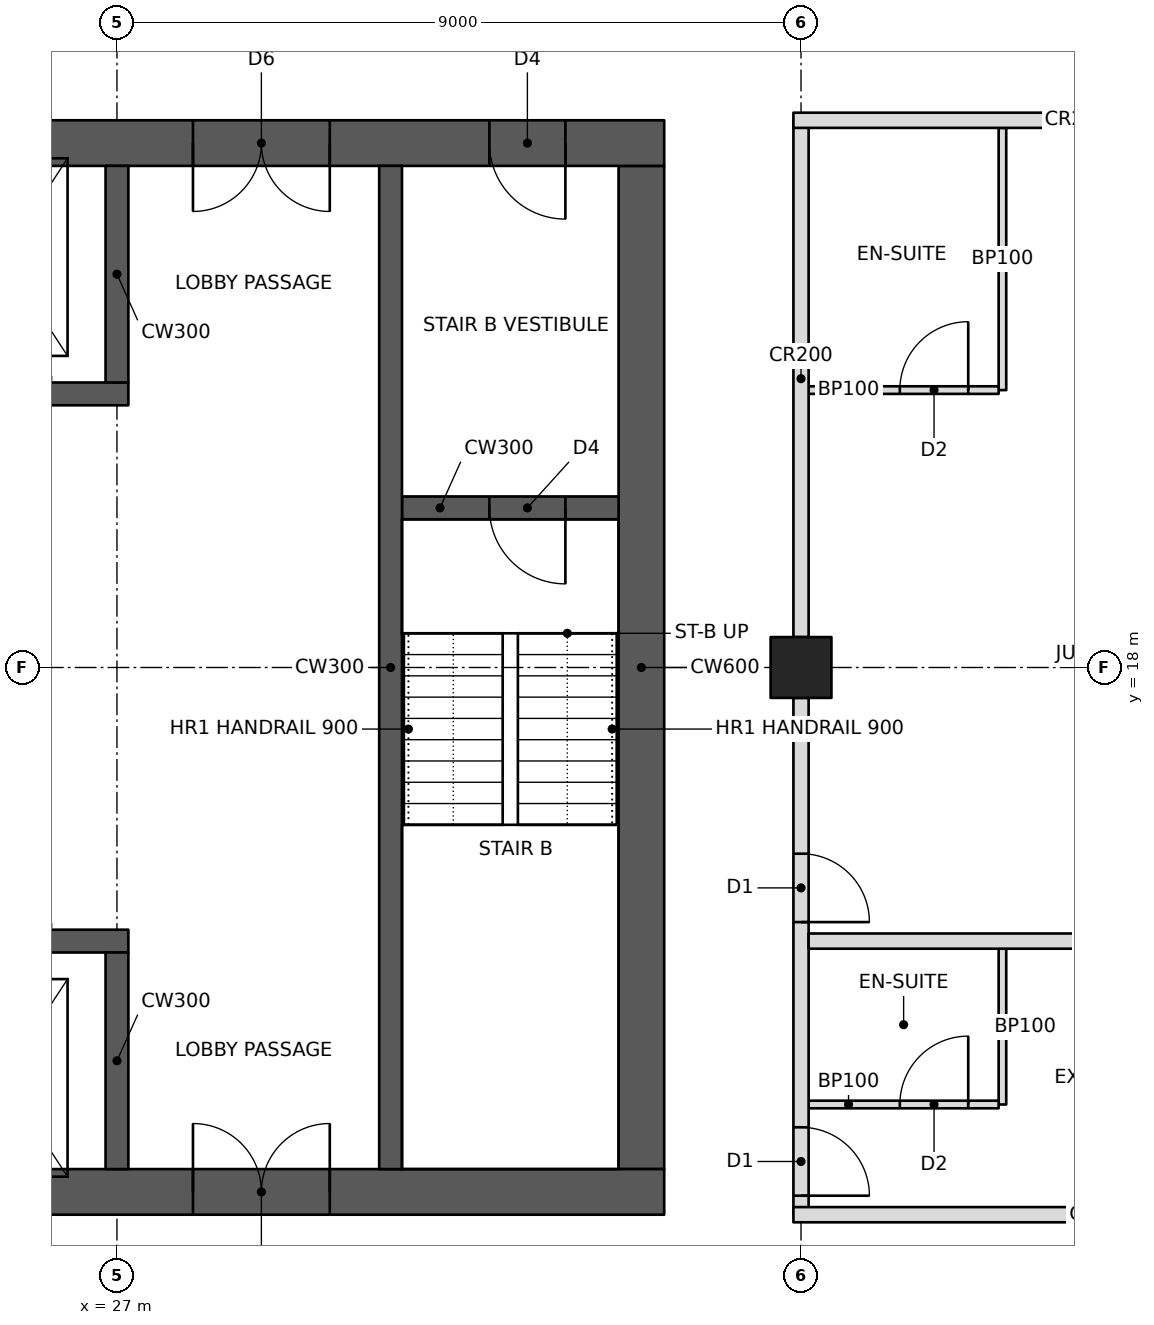
"""IFC4 building model, lengths in metres.
Left out: names, types, materials, properties, quantities, classifications, styles, units other than length and angle.
Written with IfcOpenShell. Run it as: python <this file> out.ifc"""

import sys

from ifc_helpers import new_model, si_unit, direction, frame, frame_2d, origin, origin_2d, place, context, subcontext, project, spatial, rectangle, hollow_rectangle, extrude, element, fill, save


model = new_model("IFC4")
c1 = context("Model", 3, precision=1e-05, world=origin(), true_north=direction((0.0, 1.0)))
c2 = subcontext(c1, "Body", "Model", "MODEL_VIEW")
j1 = project(units=[si_unit("LENGTHUNIT", "METRE"), si_unit("PLANEANGLEUNIT", "RADIAN")], contexts=[c1])
p1 = place(None, origin())
s1 = spatial("IfcSite", under=j1, at=p1, CompositionType="ELEMENT")
p2 = place(p1, origin())
s2 = spatial("IfcBuilding", under=s1, at=p2, CompositionType="ELEMENT")
p3 = place(p2, frame((0.0, 0.0, 177.4)))
s3 = spatial("IfcBuildingStorey", under=s2, at=p3, CompositionType="ELEMENT", Elevation=177.4)
p4 = place(p3, frame((36.0, 18.0, 0.0), z_axis=(0.0, 0.0, 1.0), x_axis=(0.0, 1.0, 0.0)))
e1 = element("IfcColumn", 1, at=p4, inside=s3, PredefinedType="COLUMN", context=c2, shape_type="SweptSolid", body=[
    extrude(hollow_rectangle(XDim=0.8, YDim=0.8, WallThickness=0.06, at=origin_2d()), origin(), (0.0, 0.0, 1.0), 3.4),
])
p5 = place(p3, frame((10.8, 11.1, 0.0), z_axis=(0.0, 0.0, 1.0), x_axis=(1.0, 0.0, 0.0)))
e2 = element("IfcWall", 2, at=p5, inside=s3, PredefinedType="SHEAR", context=c2, shape_type="SweptSolid", body=[
    extrude(rectangle(XDim=23.4, YDim=0.6, at=frame_2d((11.7, 0.0))), origin(), (0.0, 0.0, 1.0), 3.4),
])
p6 = place(p5, frame((1.0, 0.0, 0.0)))
e3 = element("IfcOpeningElement", 3, at=p6, cuts=e2, PredefinedType="OPENING", context=c2, shape_type="SweptSolid", body=[
    extrude(rectangle(XDim=1.0, YDim=2.1, at=frame_2d((0.5, 1.05))), frame((0.0, 0.31, 0.0), z_axis=(0.0, -1.0, 0.0), x_axis=(1.0, 0.0, 0.0)), (0.0, 0.0, 1.0), 0.62),
])
p7 = place(p5, frame((17.2, 0.0, 0.0)))
e4 = element("IfcOpeningElement", 4, at=p7, cuts=e2, PredefinedType="OPENING", context=c2, shape_type="SweptSolid", body=[
    extrude(rectangle(XDim=1.8, YDim=2.1, at=frame_2d((0.9, 1.05))), frame((0.0, 0.31, 0.0), z_axis=(0.0, -1.0, 0.0), x_axis=(1.0, 0.0, 0.0)), (0.0, 0.0, 1.0), 0.62),
])
p8 = place(p3, frame((10.8, 24.9, 0.0), z_axis=(0.0, 0.0, 1.0), x_axis=(1.0, 0.0, 0.0)))
e5 = element("IfcWall", 5, at=p8, inside=s3, PredefinedType="SHEAR", context=c2, shape_type="SweptSolid", body=[
    extrude(rectangle(XDim=23.4, YDim=0.6, at=frame_2d((11.7, 0.0))), origin(), (0.0, 0.0, 1.0), 3.4),
])
p9 = place(p8, frame((17.2, 0.0, 0.0)))
e6 = element("IfcOpeningElement", 6, at=p9, cuts=e5, PredefinedType="OPENING", context=c2, shape_type="SweptSolid", body=[
    extrude(rectangle(XDim=1.8, YDim=2.1, at=frame_2d((0.9, 1.05))), frame((0.0, 0.31, 0.0), z_axis=(0.0, -1.0, 0.0), x_axis=(1.0, 0.0, 0.0)), (0.0, 0.0, 1.0), 0.62),
])
p10 = place(p8, frame((21.1, 0.0, 0.0)))
e7 = element("IfcOpeningElement", 7, at=p10, cuts=e5, PredefinedType="OPENING", context=c2, shape_type="SweptSolid", body=[
    extrude(rectangle(XDim=1.0, YDim=2.1, at=frame_2d((0.5, 1.05))), frame((0.0, 0.31, 0.0), z_axis=(0.0, -1.0, 0.0), x_axis=(1.0, 0.0, 0.0)), (0.0, 0.0, 1.0), 0.62),
])
p11 = place(p8, frame((4.9, 0.0, 0.0)))
e8 = element("IfcOpeningElement", 8, at=p11, cuts=e5, PredefinedType="OPENING", context=c2, shape_type="SweptSolid", body=[
    extrude(rectangle(XDim=1.0, YDim=2.1, at=frame_2d((0.5, 1.05))), frame((0.0, 0.31, 0.0), z_axis=(0.0, -1.0, 0.0), x_axis=(1.0, 0.0, 0.0)), (0.0, 0.0, 1.0), 0.62),
])
p12 = place(p3, frame((33.9, 11.4, 0.0), z_axis=(0.0, 0.0, 1.0), x_axis=(0.0, 1.0, 0.0)))
e9 = element("IfcWall", 9, at=p12, inside=s3, PredefinedType="SHEAR", context=c2, shape_type="SweptSolid", body=[
    extrude(rectangle(XDim=13.2, YDim=0.6, at=frame_2d((6.6, 0.0))), origin(), (0.0, 0.0, 1.0), 3.4),
])
p13 = place(p3, frame((18.15, 14.4, 0.0), z_axis=(0.0, 0.0, 1.0), x_axis=(1.0, 0.0, 0.0)))
e10 = element("IfcWall", 10, at=p13, inside=s3, PredefinedType="SHEAR", context=c2, shape_type="SweptSolid", body=[
    extrude(rectangle(XDim=9.0, YDim=0.3, at=frame_2d((4.5, 0.0))), origin(), (0.0, 0.0, 1.0), 3.4),
])
p14 = place(p13, frame((0.8, 0.0, 0.0)))
e11 = element("IfcOpeningElement", 11, at=p14, cuts=e10, PredefinedType="OPENING", context=c2, shape_type="SweptSolid", body=[
    extrude(rectangle(XDim=1.1, YDim=2.1, at=frame_2d((0.55, 1.05))), frame((0.0, 0.16, 0.0), z_axis=(0.0, -1.0, 0.0), x_axis=(1.0, 0.0, 0.0)), (0.0, 0.0, 1.0), 0.32),
])
p15 = place(p13, frame((6.75, 0.0, 0.0)))
e12 = element("IfcOpeningElement", 12, at=p15, cuts=e10, PredefinedType="OPENING", context=c2, shape_type="SweptSolid", body=[
    extrude(rectangle(XDim=1.2, YDim=2.1, at=frame_2d((0.6, 1.05))), frame((0.0, 0.16, 0.0), z_axis=(0.0, -1.0, 0.0), x_axis=(1.0, 0.0, 0.0)), (0.0, 0.0, 1.0), 0.32),
])
p16 = place(p13, frame((3.8, 0.0, 0.0)))
e13 = element("IfcOpeningElement", 13, at=p16, cuts=e10, PredefinedType="OPENING", context=c2, shape_type="SweptSolid", body=[
    extrude(rectangle(XDim=1.1, YDim=2.1, at=frame_2d((0.55, 1.05))), frame((0.0, 0.16, 0.0), z_axis=(0.0, -1.0, 0.0), x_axis=(1.0, 0.0, 0.0)), (0.0, 0.0, 1.0), 0.32),
])
p17 = place(p3, frame((27.0, 11.4, 0.0), z_axis=(0.0, 0.0, 1.0), x_axis=(0.0, 1.0, 0.0)))
e14 = element("IfcWall", 14, at=p17, inside=s3, PredefinedType="SHEAR", context=c2, shape_type="SweptSolid", body=[
    extrude(rectangle(XDim=2.85, YDim=0.3, at=frame_2d((1.425, 0.0))), origin(), (0.0, 0.0, 1.0), 3.4),
])
p18 = place(p3, frame((18.15, 21.6, 0.0), z_axis=(0.0, 0.0, 1.0), x_axis=(1.0, 0.0, 0.0)))
e15 = element("IfcWall", 15, at=p18, inside=s3, PredefinedType="SHEAR", context=c2, shape_type="SweptSolid", body=[
    extrude(rectangle(XDim=9.0, YDim=0.3, at=frame_2d((4.5, 0.0))), origin(), (0.0, 0.0, 1.0), 3.4),
])
p19 = place(p18, frame((6.75, 0.0, 0.0)))
e16 = element("IfcOpeningElement", 16, at=p19, cuts=e15, PredefinedType="OPENING", context=c2, shape_type="SweptSolid", body=[
    extrude(rectangle(XDim=1.2, YDim=2.1, at=frame_2d((0.6, 1.05))), frame((0.0, 0.16, 0.0), z_axis=(0.0, -1.0, 0.0), x_axis=(1.0, 0.0, 0.0)), (0.0, 0.0, 1.0), 0.32),
])
p20 = place(p18, frame((0.8, 0.0, 0.0)))
e17 = element("IfcOpeningElement", 17, at=p20, cuts=e15, PredefinedType="OPENING", context=c2, shape_type="SweptSolid", body=[
    extrude(rectangle(XDim=1.1, YDim=2.1, at=frame_2d((0.55, 1.05))), frame((0.0, 0.16, 0.0), z_axis=(0.0, -1.0, 0.0), x_axis=(1.0, 0.0, 0.0)), (0.0, 0.0, 1.0), 0.32),
])
p21 = place(p18, frame((3.8, 0.0, 0.0)))
e18 = element("IfcOpeningElement", 18, at=p21, cuts=e15, PredefinedType="OPENING", context=c2, shape_type="SweptSolid", body=[
    extrude(rectangle(XDim=1.1, YDim=2.1, at=frame_2d((0.55, 1.05))), frame((0.0, 0.16, 0.0), z_axis=(0.0, -1.0, 0.0), x_axis=(1.0, 0.0, 0.0)), (0.0, 0.0, 1.0), 0.32),
])
p22 = place(p3, frame((27.0, 21.75, 0.0), z_axis=(0.0, 0.0, 1.0), x_axis=(0.0, 1.0, 0.0)))
e19 = element("IfcWall", 19, at=p22, inside=s3, PredefinedType="SHEAR", context=c2, shape_type="SweptSolid", body=[
    extrude(rectangle(XDim=2.85, YDim=0.3, at=frame_2d((1.425, 0.0))), origin(), (0.0, 0.0, 1.0), 3.4),
])
p23 = place(p3, frame((30.6, 11.4, 0.0), z_axis=(0.0, 0.0, 1.0), x_axis=(0.0, 1.0, 0.0)))
e20 = element("IfcWall", 20, at=p23, inside=s3, PredefinedType="SHEAR", context=c2, shape_type="SweptSolid", body=[
    extrude(rectangle(XDim=13.2, YDim=0.3, at=frame_2d((6.6, 0.0))), origin(), (0.0, 0.0, 1.0), 3.4),
])
p24 = place(p3, frame((30.75, 20.1, 0.0), z_axis=(0.0, 0.0, 1.0), x_axis=(1.0, 0.0, 0.0)))
e21 = element("IfcWall", 21, at=p24, inside=s3, PredefinedType="SHEAR", context=c2, shape_type="SweptSolid", body=[
    extrude(rectangle(XDim=2.85, YDim=0.3, at=frame_2d((1.425, 0.0))), origin(), (0.0, 0.0, 1.0), 3.4),
])
p25 = place(p24, frame((1.15, 0.0, 0.0)))
e22 = element("IfcOpeningElement", 22, at=p25, cuts=e21, PredefinedType="OPENING", context=c2, shape_type="SweptSolid", body=[
    extrude(rectangle(XDim=1.0, YDim=2.1, at=frame_2d((0.5, 1.05))), frame((0.0, 0.16, 0.0), z_axis=(0.0, -1.0, 0.0), x_axis=(1.0, 0.0, 0.0)), (0.0, 0.0, 1.0), 0.32),
])
p26 = place(p3, frame((36.0, 10.8, 0.0), z_axis=(0.0, 0.0, 1.0), x_axis=(0.0, 1.0, 0.0)))
e23 = element("IfcWall", 23, at=p26, inside=s3, PredefinedType="PARTITIONING", context=c2, shape_type="SweptSolid", body=[
    extrude(rectangle(XDim=6.8, YDim=0.2, at=frame_2d((3.4, 0.0))), origin(), (0.0, 0.0, 1.0), 2.405),
])
p27 = place(p26, frame((0.25, 0.0, 0.0)))
e24 = element("IfcOpeningElement", 24, at=p27, cuts=e23, PredefinedType="OPENING", context=c2, shape_type="SweptSolid", body=[
    extrude(rectangle(XDim=0.9, YDim=2.1, at=frame_2d((0.45, 1.05))), frame((0.0, 0.11, 0.0), z_axis=(0.0, -1.0, 0.0), x_axis=(1.0, 0.0, 0.0)), (0.0, 0.0, 1.0), 0.22),
])
p28 = place(p26, frame((3.85, 0.0, 0.0)))
e25 = element("IfcOpeningElement", 25, at=p28, cuts=e23, PredefinedType="OPENING", context=c2, shape_type="SweptSolid", body=[
    extrude(rectangle(XDim=0.9, YDim=2.1, at=frame_2d((0.45, 1.05))), frame((0.0, 0.11, 0.0), z_axis=(0.0, -1.0, 0.0), x_axis=(1.0, 0.0, 0.0)), (0.0, 0.0, 1.0), 0.22),
])
p29 = place(p3, frame((36.0, 18.4, 0.0), z_axis=(0.0, 0.0, 1.0), x_axis=(0.0, 1.0, 0.0)))
e26 = element("IfcWall", 26, at=p29, inside=s3, PredefinedType="PARTITIONING", context=c2, shape_type="SweptSolid", body=[
    extrude(rectangle(XDim=6.8, YDim=0.2, at=frame_2d((3.4, 0.0))), origin(), (0.0, 0.0, 1.0), 2.405),
])
p30 = place(p3, frame((35.9, 10.8, 0.0), z_axis=(0.0, 0.0, 1.0), x_axis=(1.0, 0.0, 0.0)))
e27 = element("IfcWall", 27, at=p30, inside=s3, PredefinedType="PARTITIONING", context=c2, shape_type="SweptSolid", body=[
    extrude(rectangle(XDim=8.1, YDim=0.2, at=frame_2d((4.05, 0.0))), origin(), (0.0, 0.0, 1.0), 2.404),
])
p31 = place(p3, frame((35.9, 25.2, 0.0), z_axis=(0.0, 0.0, 1.0), x_axis=(1.0, 0.0, 0.0)))
e28 = element("IfcWall", 28, at=p31, inside=s3, PredefinedType="PARTITIONING", context=c2, shape_type="SweptSolid", body=[
    extrude(rectangle(XDim=7.45, YDim=0.2, at=frame_2d((3.725, 0.0))), origin(), (0.0, 0.0, 1.0), 2.404),
])
p32 = place(p3, frame((36.1, 14.4, 0.0), z_axis=(0.0, 0.0, 1.0), x_axis=(1.0, 0.0, 0.0)))
e29 = element("IfcWall", 29, at=p32, inside=s3, PredefinedType="PARTITIONING", context=c2, shape_type="SweptSolid", body=[
    extrude(rectangle(XDim=7.9, YDim=0.2, at=frame_2d((3.95, 0.0))), origin(), (0.0, 0.0, 1.0), 2.404),
])
p33 = place(p3, frame((38.65, 12.25, 0.0), z_axis=(0.0, 0.0, 1.0), x_axis=(0.0, 1.0, 0.0)))
e30 = element("IfcWall", 30, at=p33, inside=s3, PredefinedType="PARTITIONING", context=c2, shape_type="SweptSolid", body=[
    extrude(rectangle(XDim=2.05, YDim=0.1, at=frame_2d((1.025, 0.0))), origin(), (0.0, 0.0, 1.0), 3.2),
])
p34 = place(p3, frame((36.1, 12.25, 0.0), z_axis=(0.0, 0.0, 1.0), x_axis=(1.0, 0.0, 0.0)))
e31 = element("IfcWall", 31, at=p34, inside=s3, PredefinedType="PARTITIONING", context=c2, shape_type="SweptSolid", body=[
    extrude(rectangle(XDim=2.5, YDim=0.1, at=frame_2d((1.25, 0.0))), origin(), (0.0, 0.0, 1.0), 2.404),
])
p35 = place(p34, frame((1.2, 0.0, 0.0)))
e32 = element("IfcOpeningElement", 32, at=p35, cuts=e31, PredefinedType="OPENING", context=c2, shape_type="SweptSolid", body=[
    extrude(rectangle(XDim=0.9, YDim=2.1, at=frame_2d((0.45, 1.05))), frame((0.0, 0.06, 0.0), z_axis=(0.0, -1.0, 0.0), x_axis=(1.0, 0.0, 0.0)), (0.0, 0.0, 1.0), 0.12),
])
p36 = place(p3, frame((38.65, 21.65, 0.0), z_axis=(0.0, 0.0, 1.0), x_axis=(0.0, 1.0, 0.0)))
e33 = element("IfcWall", 33, at=p36, inside=s3, PredefinedType="PARTITIONING", context=c2, shape_type="SweptSolid", body=[
    extrude(rectangle(XDim=3.45, YDim=0.1, at=frame_2d((1.725, 0.0))), origin(), (0.0, 0.0, 1.0), 3.2),
])
p37 = place(p3, frame((36.1, 21.65, 0.0), z_axis=(0.0, 0.0, 1.0), x_axis=(1.0, 0.0, 0.0)))
e34 = element("IfcWall", 34, at=p37, inside=s3, PredefinedType="PARTITIONING", context=c2, shape_type="SweptSolid", body=[
    extrude(rectangle(XDim=2.5, YDim=0.1, at=frame_2d((1.25, 0.0))), origin(), (0.0, 0.0, 1.0), 2.404),
])
p38 = place(p37, frame((1.2, 0.0, 0.0)))
e35 = element("IfcOpeningElement", 35, at=p38, cuts=e34, PredefinedType="OPENING", context=c2, shape_type="SweptSolid", body=[
    extrude(rectangle(XDim=0.9, YDim=2.1, at=frame_2d((0.45, 1.05))), frame((0.0, 0.06, 0.0), z_axis=(0.0, -1.0, 0.0), x_axis=(1.0, 0.0, 0.0)), (0.0, 0.0, 1.0), 0.12),
])
p39 = place(p35, origin())
e36 = element("IfcDoor", 36, at=p39, inside=s3, OperationType="SINGLE_SWING_RIGHT", PredefinedType="DOOR", context=c2, shape_type="SweptSolid", body=[
    extrude(rectangle(XDim=0.9, YDim=2.1, at=frame_2d((0.45, 1.05))), frame((0.0, 0.025, 0.0), z_axis=(0.0, -1.0, 0.0), x_axis=(1.0, 0.0, 0.0)), (0.0, 0.0, 1.0), 0.05),
])
fill(e32, e36)
p40 = place(p27, frame((0.9, 0.0, 0.0), z_axis=(0.0, 0.0, 1.0), x_axis=(-1.0, 0.0, 0.0)))
e37 = element("IfcDoor", 37, at=p40, inside=s3, OperationType="SINGLE_SWING_RIGHT", PredefinedType="DOOR", context=c2, shape_type="SweptSolid", body=[
    extrude(rectangle(XDim=0.9, YDim=2.1, at=frame_2d((0.45, 1.05))), frame((0.0, 0.025, 0.0), z_axis=(0.0, -1.0, 0.0), x_axis=(1.0, 0.0, 0.0)), (0.0, 0.0, 1.0), 0.05),
])
fill(e24, e37)
p41 = place(p38, origin())
e38 = element("IfcDoor", 38, at=p41, inside=s3, OperationType="SINGLE_SWING_RIGHT", PredefinedType="DOOR", context=c2, shape_type="SweptSolid", body=[
    extrude(rectangle(XDim=0.9, YDim=2.1, at=frame_2d((0.45, 1.05))), frame((0.0, 0.025, 0.0), z_axis=(0.0, -1.0, 0.0), x_axis=(1.0, 0.0, 0.0)), (0.0, 0.0, 1.0), 0.05),
])
fill(e35, e38)
p42 = place(p28, frame((0.9, 0.0, 0.0), z_axis=(0.0, 0.0, 1.0), x_axis=(-1.0, 0.0, 0.0)))
e39 = element("IfcDoor", 39, at=p42, inside=s3, OperationType="SINGLE_SWING_RIGHT", PredefinedType="DOOR", context=c2, shape_type="SweptSolid", body=[
    extrude(rectangle(XDim=0.9, YDim=2.1, at=frame_2d((0.45, 1.05))), frame((0.0, 0.025, 0.0), z_axis=(0.0, -1.0, 0.0), x_axis=(1.0, 0.0, 0.0)), (0.0, 0.0, 1.0), 0.05),
])
fill(e25, e39)
p43 = place(p7, origin())
e40 = element("IfcDoor", 40, at=p43, inside=s3, OperationType="DOUBLE_DOOR_SINGLE_SWING", PredefinedType="DOOR", context=c2, shape_type="SweptSolid", body=[
    extrude(rectangle(XDim=1.8, YDim=2.1, at=frame_2d((0.9, 1.05))), frame((0.0, 0.025, 0.0), z_axis=(0.0, -1.0, 0.0), x_axis=(1.0, 0.0, 0.0)), (0.0, 0.0, 1.0), 0.05),
])
fill(e4, e40)
p44 = place(p9, frame((1.8, 0.0, 0.0), z_axis=(0.0, 0.0, 1.0), x_axis=(-1.0, 0.0, 0.0)))
e41 = element("IfcDoor", 41, at=p44, inside=s3, OperationType="DOUBLE_DOOR_SINGLE_SWING", PredefinedType="DOOR", context=c2, shape_type="SweptSolid", body=[
    extrude(rectangle(XDim=1.8, YDim=2.1, at=frame_2d((0.9, 1.05))), frame((0.0, 0.025, 0.0), z_axis=(0.0, -1.0, 0.0), x_axis=(1.0, 0.0, 0.0)), (0.0, 0.0, 1.0), 0.05),
])
fill(e6, e41)
p45 = place(p10, frame((1.0, 0.0, 0.0), z_axis=(0.0, 0.0, 1.0), x_axis=(-1.0, 0.0, 0.0)))
e42 = element("IfcDoor", 42, at=p45, inside=s3, OperationType="SINGLE_SWING_LEFT", PredefinedType="DOOR", context=c2, shape_type="SweptSolid", body=[
    extrude(rectangle(XDim=1.0, YDim=2.1, at=frame_2d((0.5, 1.05))), frame((0.0, 0.025, 0.0), z_axis=(0.0, -1.0, 0.0), x_axis=(1.0, 0.0, 0.0)), (0.0, 0.0, 1.0), 0.05),
])
fill(e7, e42)
p46 = place(p25, frame((1.0, 0.0, 0.0), z_axis=(0.0, 0.0, 1.0), x_axis=(-1.0, 0.0, 0.0)))
e43 = element("IfcDoor", 43, at=p46, inside=s3, OperationType="SINGLE_SWING_LEFT", PredefinedType="DOOR", context=c2, shape_type="SweptSolid", body=[
    extrude(rectangle(XDim=1.0, YDim=2.1, at=frame_2d((0.5, 1.05))), frame((0.0, 0.025, 0.0), z_axis=(0.0, -1.0, 0.0), x_axis=(1.0, 0.0, 0.0)), (0.0, 0.0, 1.0), 0.05),
])
fill(e22, e43)
save(model, sys.argv[1])
